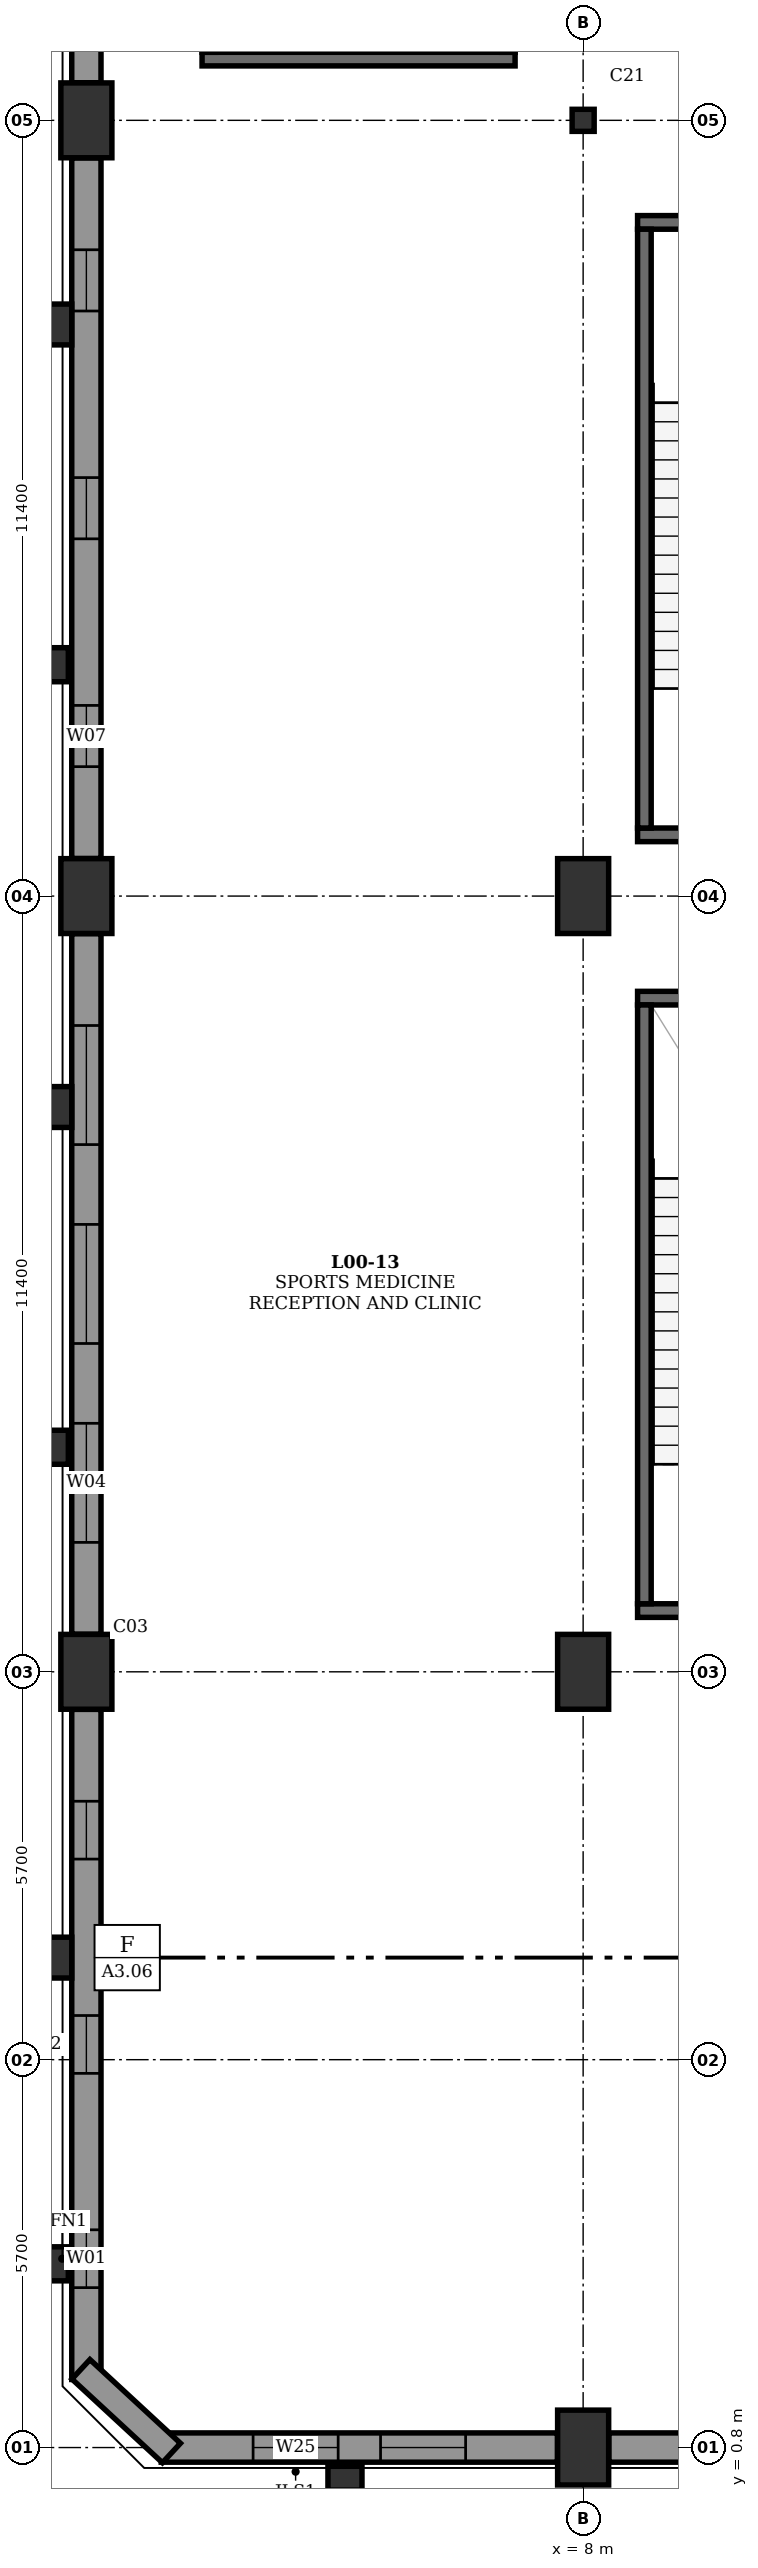
"""IFC4 building model, lengths in metres.
Left out: names, types, materials, properties, quantities, classifications, styles, units other than length and angle.
Written with IfcOpenShell. Run it as: python <this file> out.ifc"""

import sys

from ifc_helpers import new_model, si_unit, direction, frame, frame_2d, origin, origin_2d, place, context, subcontext, project, spatial, rectangle, hollow_circle, extrude, element, fill, save


model = new_model("IFC4")
c1 = context("Model", 3, precision=1e-05, world=origin(), true_north=direction((0.0, 1.0)))
c2 = subcontext(c1, "Body", "Model", "MODEL_VIEW")
j1 = project(units=[si_unit("LENGTHUNIT", "METRE"), si_unit("PLANEANGLEUNIT", "RADIAN")], contexts=[c1])
p1 = place(None, origin())
s1 = spatial("IfcSite", under=j1, at=p1, CompositionType="ELEMENT")
p2 = place(p1, origin())
s2 = spatial("IfcBuilding", under=s1, at=p2, CompositionType="ELEMENT")
p3 = place(p2, origin())
s3 = spatial("IfcBuildingStorey", under=s2, at=p3, CompositionType="ELEMENT", Elevation=0.0)
for number, where, z_axis, x_axis in (
    (1, (0.7, 12.2, 0.0), (0.0, 0.0, 1.0), (1.0, 0.0, 0.0)),
    (2, (0.7, 23.6, 0.0), (0.0, 0.0, 1.0), (1.0, 0.0, 0.0)),
    (3, (0.7, 35.0, 0.0), (0.0, 0.0, 1.0), (1.0, 0.0, 0.0)),
    (4, (8.0, 0.8, 0.0), (0.0, 0.0, 1.0), (1.0, 0.0, 0.0)),
    (5, (8.0, 12.2, 0.0), (0.0, 0.0, 1.0), (1.0, 0.0, 0.0)),
    (6, (8.0, 23.6, 0.0), (0.0, 0.0, 1.0), (1.0, 0.0, 0.0)),
):
    element("IfcColumn", number, at=place(p3, frame(where, z_axis=z_axis, x_axis=x_axis)), inside=s3, PredefinedType="COLUMN", context=c2, shape_type="SweptSolid", body=[
        extrude(rectangle(XDim=0.75, YDim=1.1, at=origin_2d()), origin(), (0.0, 0.0, 1.0), 5.4),
    ])
p4 = place(p3, frame((8.0, 35.0, 0.0), z_axis=(0.0, 0.0, 1.0), x_axis=(1.0, 0.0, 0.0)))
e7 = element("IfcColumn", 7, at=p4, inside=s3, PredefinedType="COLUMN", context=c2, shape_type="SweptSolid", body=[
    extrude(hollow_circle(Radius=0.162, WallThickness=0.013, at=origin_2d()), origin(), (0.0, 0.0, 1.0), 5.4),
])
p5 = place(p3, frame((0.26, 3.5, 0.0), z_axis=(0.0, 0.0, 1.0), x_axis=(1.0, 0.0, 0.0)))
e8 = element("IfcColumn", 8, at=p5, inside=s3, PredefinedType="PILASTER", context=c2, shape_type="SweptSolid", body=[
    extrude(rectangle(XDim=0.35, YDim=0.5, at=origin_2d()), origin(), (0.0, 0.0, 1.0), 5.4),
])
p6 = place(p3, frame((0.26, 8.0, 0.0), z_axis=(0.0, 0.0, 1.0), x_axis=(1.0, 0.0, 0.0)))
e9 = element("IfcColumn", 9, at=p6, inside=s3, PredefinedType="PILASTER", context=c2, shape_type="SweptSolid", body=[
    extrude(rectangle(XDim=0.45, YDim=0.6, at=origin_2d()), origin(), (0.0, 0.0, 1.0), 5.4),
])
p7 = place(p3, frame((0.26, 15.5, 0.0), z_axis=(0.0, 0.0, 1.0), x_axis=(1.0, 0.0, 0.0)))
e10 = element("IfcColumn", 10, at=p7, inside=s3, PredefinedType="PILASTER", context=c2, shape_type="SweptSolid", body=[
    extrude(rectangle(XDim=0.35, YDim=0.5, at=origin_2d()), origin(), (0.0, 0.0, 1.0), 5.4),
])
p8 = place(p3, frame((0.26, 20.5, 0.0), z_axis=(0.0, 0.0, 1.0), x_axis=(1.0, 0.0, 0.0)))
e11 = element("IfcColumn", 11, at=p8, inside=s3, PredefinedType="PILASTER", context=c2, shape_type="SweptSolid", body=[
    extrude(rectangle(XDim=0.45, YDim=0.6, at=origin_2d()), origin(), (0.0, 0.0, 1.0), 5.4),
])
p9 = place(p3, frame((0.26, 27.0, 0.0), z_axis=(0.0, 0.0, 1.0), x_axis=(1.0, 0.0, 0.0)))
e12 = element("IfcColumn", 12, at=p9, inside=s3, PredefinedType="PILASTER", context=c2, shape_type="SweptSolid", body=[
    extrude(rectangle(XDim=0.35, YDim=0.5, at=origin_2d()), origin(), (0.0, 0.0, 1.0), 5.4),
])
p10 = place(p3, frame((0.26, 32.0, 0.0), z_axis=(0.0, 0.0, 1.0), x_axis=(1.0, 0.0, 0.0)))
e13 = element("IfcColumn", 13, at=p10, inside=s3, PredefinedType="PILASTER", context=c2, shape_type="SweptSolid", body=[
    extrude(rectangle(XDim=0.45, YDim=0.6, at=origin_2d()), origin(), (0.0, 0.0, 1.0), 5.4),
])
p11 = place(p3, frame((4.5, 0.35, 0.0), z_axis=(0.0, 0.0, 1.0), x_axis=(0.0, 1.0, 0.0)))
e14 = element("IfcColumn", 14, at=p11, inside=s3, PredefinedType="PILASTER", context=c2, shape_type="SweptSolid", body=[
    extrude(rectangle(XDim=0.35, YDim=0.5, at=origin_2d()), origin(), (0.0, 0.0, 1.0), 5.4),
])
p12 = place(p3, frame((0.7, 1.8, 0.0), z_axis=(0.0, 0.0, 1.0), x_axis=(0.0, 1.0, 0.0)))
e15 = element("IfcWall", 15, at=p12, inside=s3, PredefinedType="STANDARD", context=c2, shape_type="SweptSolid", body=[
    extrude(rectangle(XDim=9.848, YDim=0.43, at=frame_2d((4.924, 0.0))), origin(), (0.0, 0.0, 1.0), 5.1),
])
p13 = place(p12, frame((1.35, 0.0, 0.75)))
e16 = element("IfcOpeningElement", 16, at=p13, cuts=e15, PredefinedType="OPENING", context=c2, shape_type="SweptSolid", body=[
    extrude(rectangle(XDim=0.85, YDim=1.75, at=frame_2d((0.425, 0.875))), frame((0.0, 0.227, 0.0), z_axis=(0.0, -1.0, 0.0), x_axis=(1.0, 0.0, 0.0)), (0.0, 0.0, 1.0), 0.454),
])
p14 = place(p12, frame((4.499, 0.0, 0.75)))
e17 = element("IfcOpeningElement", 17, at=p14, cuts=e15, PredefinedType="OPENING", context=c2, shape_type="SweptSolid", body=[
    extrude(rectangle(XDim=0.85, YDim=1.75, at=frame_2d((0.425, 0.875))), frame((0.0, 0.227, 0.0), z_axis=(0.0, -1.0, 0.0), x_axis=(1.0, 0.0, 0.0)), (0.0, 0.0, 1.0), 0.454),
])
p15 = place(p12, frame((7.648, 0.0, 0.75)))
e18 = element("IfcOpeningElement", 18, at=p15, cuts=e15, PredefinedType="OPENING", context=c2, shape_type="SweptSolid", body=[
    extrude(rectangle(XDim=0.85, YDim=1.75, at=frame_2d((0.425, 0.875))), frame((0.0, 0.227, 0.0), z_axis=(0.0, -1.0, 0.0), x_axis=(1.0, 0.0, 0.0)), (0.0, 0.0, 1.0), 0.454),
])
p16 = place(p3, frame((0.7, 12.752, 0.0), z_axis=(0.0, 0.0, 1.0), x_axis=(0.0, 1.0, 0.0)))
e19 = element("IfcWall", 19, at=p16, inside=s3, PredefinedType="STANDARD", context=c2, shape_type="SweptSolid", body=[
    extrude(rectangle(XDim=10.296, YDim=0.43, at=frame_2d((5.148, 0.0))), origin(), (0.0, 0.0, 1.0), 3.485),
])
p17 = place(p16, frame((1.35, 0.0, 0.75)))
e20 = element("IfcOpeningElement", 20, at=p17, cuts=e19, PredefinedType="OPENING", context=c2, shape_type="SweptSolid", body=[
    extrude(rectangle(XDim=1.75, YDim=1.75, at=frame_2d((0.875, 0.875))), frame((0.0, 0.227, 0.0), z_axis=(0.0, -1.0, 0.0), x_axis=(1.0, 0.0, 0.0)), (0.0, 0.0, 1.0), 0.454),
])
p18 = place(p16, frame((4.273, 0.0, 0.75)))
e21 = element("IfcOpeningElement", 21, at=p18, cuts=e19, PredefinedType="OPENING", context=c2, shape_type="SweptSolid", body=[
    extrude(rectangle(XDim=1.75, YDim=1.75, at=frame_2d((0.875, 0.875))), frame((0.0, 0.227, 0.0), z_axis=(0.0, -1.0, 0.0), x_axis=(1.0, 0.0, 0.0)), (0.0, 0.0, 1.0), 0.454),
])
p19 = place(p16, frame((7.196, 0.0, 0.75)))
e22 = element("IfcOpeningElement", 22, at=p19, cuts=e19, PredefinedType="OPENING", context=c2, shape_type="SweptSolid", body=[
    extrude(rectangle(XDim=1.75, YDim=1.75, at=frame_2d((0.875, 0.875))), frame((0.0, 0.227, 0.0), z_axis=(0.0, -1.0, 0.0), x_axis=(1.0, 0.0, 0.0)), (0.0, 0.0, 1.0), 0.454),
])
p20 = place(p3, frame((0.7, 24.152, 0.0), z_axis=(0.0, 0.0, 1.0), x_axis=(0.0, 1.0, 0.0)))
e23 = element("IfcWall", 23, at=p20, inside=s3, PredefinedType="STANDARD", context=c2, shape_type="SweptSolid", body=[
    extrude(rectangle(XDim=10.296, YDim=0.43, at=frame_2d((5.148, 0.0))), origin(), (0.0, 0.0, 1.0), 3.51),
])
p21 = place(p20, frame((1.35, 0.0, 0.75)))
e24 = element("IfcOpeningElement", 24, at=p21, cuts=e23, PredefinedType="OPENING", context=c2, shape_type="SweptSolid", body=[
    extrude(rectangle(XDim=0.9, YDim=2.05, at=frame_2d((0.45, 1.025))), frame((0.0, 0.227, 0.0), z_axis=(0.0, -1.0, 0.0), x_axis=(1.0, 0.0, 0.0)), (0.0, 0.0, 1.0), 0.454),
])
p22 = place(p20, frame((4.698, 0.0, 0.75)))
e25 = element("IfcOpeningElement", 25, at=p22, cuts=e23, PredefinedType="OPENING", context=c2, shape_type="SweptSolid", body=[
    extrude(rectangle(XDim=0.9, YDim=2.05, at=frame_2d((0.45, 1.025))), frame((0.0, 0.227, 0.0), z_axis=(0.0, -1.0, 0.0), x_axis=(1.0, 0.0, 0.0)), (0.0, 0.0, 1.0), 0.454),
])
p23 = place(p20, frame((8.046, 0.0, 0.75)))
e26 = element("IfcOpeningElement", 26, at=p23, cuts=e23, PredefinedType="OPENING", context=c2, shape_type="SweptSolid", body=[
    extrude(rectangle(XDim=0.9, YDim=2.05, at=frame_2d((0.45, 1.025))), frame((0.0, 0.227, 0.0), z_axis=(0.0, -1.0, 0.0), x_axis=(1.0, 0.0, 0.0)), (0.0, 0.0, 1.0), 0.454),
])
p24 = place(p3, frame((0.7, 35.552, 0.0), z_axis=(0.0, 0.0, 1.0), x_axis=(0.0, 1.0, 0.0)))
e27 = element("IfcWall", 27, at=p24, inside=s3, PredefinedType="STANDARD", context=c2, shape_type="SweptSolid", body=[
    extrude(rectangle(XDim=10.296, YDim=0.43, at=frame_2d((5.148, 0.0))), origin(), (0.0, 0.0, 1.0), 3.485),
])
p25 = place(p24, frame((1.35, 0.0, 0.75)))
e28 = element("IfcOpeningElement", 28, at=p25, cuts=e27, PredefinedType="OPENING", context=c2, shape_type="SweptSolid", body=[
    extrude(rectangle(XDim=1.8, YDim=2.05, at=frame_2d((0.9, 1.025))), frame((0.0, 0.227, 0.0), z_axis=(0.0, -1.0, 0.0), x_axis=(1.0, 0.0, 0.0)), (0.0, 0.0, 1.0), 0.454),
])
p26 = place(p24, frame((4.248, 0.0, 0.75)))
e29 = element("IfcOpeningElement", 29, at=p26, cuts=e27, PredefinedType="OPENING", context=c2, shape_type="SweptSolid", body=[
    extrude(rectangle(XDim=1.8, YDim=2.05, at=frame_2d((0.9, 1.025))), frame((0.0, 0.227, 0.0), z_axis=(0.0, -1.0, 0.0), x_axis=(1.0, 0.0, 0.0)), (0.0, 0.0, 1.0), 0.454),
])
p27 = place(p24, frame((7.146, 0.0, 0.75)))
e30 = element("IfcOpeningElement", 30, at=p27, cuts=e27, PredefinedType="OPENING", context=c2, shape_type="SweptSolid", body=[
    extrude(rectangle(XDim=1.8, YDim=2.05, at=frame_2d((0.9, 1.025))), frame((0.0, 0.227, 0.0), z_axis=(0.0, -1.0, 0.0), x_axis=(1.0, 0.0, 0.0)), (0.0, 0.0, 1.0), 0.454),
])
p28 = place(p3, frame((1.8, 0.8, 0.0), z_axis=(0.0, 0.0, 1.0), x_axis=(1.0, 0.0, 0.0)))
e31 = element("IfcWall", 31, at=p28, inside=s3, PredefinedType="STANDARD", context=c2, shape_type="SweptSolid", body=[
    extrude(rectangle(XDim=5.823, YDim=0.43, at=frame_2d((2.912, 0.0))), origin(), (0.0, 0.0, 1.0), 5.1),
])
p29 = place(p28, frame((1.35, 0.0, 0.75)))
e32 = element("IfcOpeningElement", 32, at=p29, cuts=e31, PredefinedType="OPENING", context=c2, shape_type="SweptSolid", body=[
    extrude(rectangle(XDim=1.25, YDim=2.5, at=frame_2d((0.625, 1.25))), frame((0.0, 0.227, 0.0), z_axis=(0.0, -1.0, 0.0), x_axis=(1.0, 0.0, 0.0)), (0.0, 0.0, 1.0), 0.454),
])
p30 = place(p28, frame((3.223, 0.0, 0.75)))
e33 = element("IfcOpeningElement", 33, at=p30, cuts=e31, PredefinedType="OPENING", context=c2, shape_type="SweptSolid", body=[
    extrude(rectangle(XDim=1.25, YDim=2.5, at=frame_2d((0.625, 1.25))), frame((0.0, 0.227, 0.0), z_axis=(0.0, -1.0, 0.0), x_axis=(1.0, 0.0, 0.0)), (0.0, 0.0, 1.0), 0.454),
])
p31 = place(p3, frame((8.377, 0.8, 0.0), z_axis=(0.0, 0.0, 1.0), x_axis=(1.0, 0.0, 0.0)))
e34 = element("IfcWall", 34, at=p31, inside=s3, PredefinedType="STANDARD", context=c2, shape_type="SweptSolid", body=[
    extrude(rectangle(XDim=7.246, YDim=0.43, at=frame_2d((3.623, 0.0))), origin(), (0.0, 0.0, 1.0), 4.612),
])
p32 = place(p31, frame((2.073, 0.0, 0.75)))
e35 = element("IfcOpeningElement", 35, at=p32, cuts=e34, PredefinedType="OPENING", context=c2, shape_type="SweptSolid", body=[
    extrude(rectangle(XDim=3.1, YDim=2.5, at=frame_2d((1.55, 1.25))), frame((0.0, 0.227, 0.0), z_axis=(0.0, -1.0, 0.0), x_axis=(1.0, 0.0, 0.0)), (0.0, 0.0, 1.0), 0.454),
])
p33 = place(p3, frame((0.62, 1.95, 0.0), z_axis=(0.0, 0.0, 1.0), x_axis=(0.734131351327, -0.679007480812, 0.0)))
e36 = element("IfcWall", 36, at=p33, inside=s3, PredefinedType="STANDARD", context=c2, shape_type="SweptSolid", body=[
    extrude(rectangle(XDim=1.812, YDim=0.39, at=frame_2d((0.906, 0.0))), origin(), (0.0, 0.0, 1.0), 5.1),
])
for number, where, z_axis, x_axis in (
    (37, (8.8, 13.1, 0.0), (0.0, 0.0, 1.0), (1.0, 0.0, 0.0)),
    (38, (8.8, 22.1, 0.0), (0.0, 0.0, 1.0), (1.0, 0.0, 0.0)),
):
    element("IfcWall", number, at=place(p3, frame(where, z_axis=z_axis, x_axis=x_axis)), inside=s3, PredefinedType="SOLIDWALL", context=c2, shape_type="SweptSolid", body=[
        extrude(rectangle(XDim=4.6, YDim=0.2, at=frame_2d((2.3, 0.0))), origin(), (0.0, 0.0, 1.0), 5.16),
    ])
p34 = place(p3, frame((8.9, 13.2, 0.0), z_axis=(0.0, 0.0, 1.0), x_axis=(0.0, 1.0, 0.0)))
e39 = element("IfcWall", 39, at=p34, inside=s3, PredefinedType="SOLIDWALL", context=c2, shape_type="SweptSolid", body=[
    extrude(rectangle(XDim=8.8, YDim=0.2, at=frame_2d((4.4, 0.0))), origin(), (0.0, 0.0, 1.0), 5.16),
])
for number, where, z_axis, x_axis in (
    (40, (8.8, 24.5, 0.0), (0.0, 0.0, 1.0), (1.0, 0.0, 0.0)),
    (41, (8.8, 33.5, 0.0), (0.0, 0.0, 1.0), (1.0, 0.0, 0.0)),
):
    element("IfcWall", number, at=place(p3, frame(where, z_axis=z_axis, x_axis=x_axis)), inside=s3, PredefinedType="SOLIDWALL", context=c2, shape_type="SweptSolid", body=[
        extrude(rectangle(XDim=4.6, YDim=0.2, at=frame_2d((2.3, 0.0))), origin(), (0.0, 0.0, 1.0), 5.16),
    ])
p35 = place(p3, frame((8.9, 24.6, 0.0), z_axis=(0.0, 0.0, 1.0), x_axis=(0.0, 1.0, 0.0)))
e42 = element("IfcWall", 42, at=p35, inside=s3, PredefinedType="SOLIDWALL", context=c2, shape_type="SweptSolid", body=[
    extrude(rectangle(XDim=8.8, YDim=0.2, at=frame_2d((4.4, 0.0))), origin(), (0.0, 0.0, 1.0), 5.16),
])
p36 = place(p3, frame((2.4, 35.9, 0.0), z_axis=(0.0, 0.0, 1.0), x_axis=(1.0, 0.0, 0.0)))
e43 = element("IfcWall", 43, at=p36, inside=s3, PredefinedType="SOLIDWALL", context=c2, shape_type="SweptSolid", body=[
    extrude(rectangle(XDim=4.6, YDim=0.2, at=frame_2d((2.3, 0.0))), origin(), (0.0, 0.0, 1.0), 5.16),
])
p37 = place(p3, frame((2.5, 36.0, 0.0), z_axis=(0.0, 0.0, 1.0), x_axis=(0.0, 1.0, 0.0)))
e44 = element("IfcWall", 44, at=p37, inside=s3, PredefinedType="SOLIDWALL", context=c2, shape_type="SweptSolid", body=[
    extrude(rectangle(XDim=8.8, YDim=0.2, at=frame_2d((4.4, 0.0))), origin(), (0.0, 0.0, 1.0), 5.16),
])
p38 = place(p3, frame((6.9, 36.0, 0.0), z_axis=(0.0, 0.0, 1.0), x_axis=(0.0, 1.0, 0.0)))
e45 = element("IfcWall", 45, at=p38, inside=s3, PredefinedType="SOLIDWALL", context=c2, shape_type="SweptSolid", body=[
    extrude(rectangle(XDim=8.8, YDim=0.2, at=frame_2d((4.4, 0.0))), origin(), (0.0, 0.0, 1.0), 5.16),
])
p39 = place(p38, frame((0.22, 0.0, 0.0)))
e46 = element("IfcOpeningElement", 46, at=p39, cuts=e45, PredefinedType="OPENING", context=c2, shape_type="SweptSolid", body=[
    extrude(rectangle(XDim=1.6, YDim=2.2, at=frame_2d((0.8, 1.1))), frame((0.0, 0.112, 0.0), z_axis=(0.0, -1.0, 0.0), x_axis=(1.0, 0.0, 0.0)), (0.0, 0.0, 1.0), 0.224),
])
p40 = place(p13, origin())
e47 = element("IfcWindow", 47, at=p40, inside=s3, PartitioningType="SINGLE_PANEL", PredefinedType="WINDOW", context=c2, shape_type="SweptSolid", body=[
    extrude(rectangle(XDim=0.85, YDim=1.75, at=frame_2d((0.425, 0.875))), frame((0.0, 0.08, 0.0), z_axis=(0.0, -1.0, 0.0), x_axis=(1.0, 0.0, 0.0)), (0.0, 0.0, 1.0), 0.06),
])
fill(e16, e47)
p41 = place(p14, origin())
e48 = element("IfcWindow", 48, at=p41, inside=s3, PartitioningType="SINGLE_PANEL", PredefinedType="WINDOW", context=c2, shape_type="SweptSolid", body=[
    extrude(rectangle(XDim=0.85, YDim=1.75, at=frame_2d((0.425, 0.875))), frame((0.0, 0.08, 0.0), z_axis=(0.0, -1.0, 0.0), x_axis=(1.0, 0.0, 0.0)), (0.0, 0.0, 1.0), 0.06),
])
fill(e17, e48)
p42 = place(p15, origin())
e49 = element("IfcWindow", 49, at=p42, inside=s3, PartitioningType="SINGLE_PANEL", PredefinedType="WINDOW", context=c2, shape_type="SweptSolid", body=[
    extrude(rectangle(XDim=0.85, YDim=1.75, at=frame_2d((0.425, 0.875))), frame((0.0, 0.08, 0.0), z_axis=(0.0, -1.0, 0.0), x_axis=(1.0, 0.0, 0.0)), (0.0, 0.0, 1.0), 0.06),
])
fill(e18, e49)
p43 = place(p17, origin())
e50 = element("IfcWindow", 50, at=p43, inside=s3, PartitioningType="DOUBLE_PANEL_VERTICAL", PredefinedType="WINDOW", context=c2, shape_type="SweptSolid", body=[
    extrude(rectangle(XDim=1.75, YDim=1.75, at=frame_2d((0.875, 0.875))), frame((0.0, 0.08, 0.0), z_axis=(0.0, -1.0, 0.0), x_axis=(1.0, 0.0, 0.0)), (0.0, 0.0, 1.0), 0.06),
])
fill(e20, e50)
p44 = place(p18, origin())
e51 = element("IfcWindow", 51, at=p44, inside=s3, PartitioningType="DOUBLE_PANEL_VERTICAL", PredefinedType="WINDOW", context=c2, shape_type="SweptSolid", body=[
    extrude(rectangle(XDim=1.75, YDim=1.75, at=frame_2d((0.875, 0.875))), frame((0.0, 0.08, 0.0), z_axis=(0.0, -1.0, 0.0), x_axis=(1.0, 0.0, 0.0)), (0.0, 0.0, 1.0), 0.06),
])
fill(e21, e51)
p45 = place(p19, origin())
e52 = element("IfcWindow", 52, at=p45, inside=s3, PartitioningType="DOUBLE_PANEL_VERTICAL", PredefinedType="WINDOW", context=c2, shape_type="SweptSolid", body=[
    extrude(rectangle(XDim=1.75, YDim=1.75, at=frame_2d((0.875, 0.875))), frame((0.0, 0.08, 0.0), z_axis=(0.0, -1.0, 0.0), x_axis=(1.0, 0.0, 0.0)), (0.0, 0.0, 1.0), 0.06),
])
fill(e22, e52)
p46 = place(p21, origin())
e53 = element("IfcWindow", 53, at=p46, inside=s3, PartitioningType="SINGLE_PANEL", PredefinedType="WINDOW", context=c2, shape_type="SweptSolid", body=[
    extrude(rectangle(XDim=0.9, YDim=2.05, at=frame_2d((0.45, 1.025))), frame((0.0, 0.08, 0.0), z_axis=(0.0, -1.0, 0.0), x_axis=(1.0, 0.0, 0.0)), (0.0, 0.0, 1.0), 0.06),
])
fill(e24, e53)
p47 = place(p22, origin())
e54 = element("IfcWindow", 54, at=p47, inside=s3, PartitioningType="SINGLE_PANEL", PredefinedType="WINDOW", context=c2, shape_type="SweptSolid", body=[
    extrude(rectangle(XDim=0.9, YDim=2.05, at=frame_2d((0.45, 1.025))), frame((0.0, 0.08, 0.0), z_axis=(0.0, -1.0, 0.0), x_axis=(1.0, 0.0, 0.0)), (0.0, 0.0, 1.0), 0.06),
])
fill(e25, e54)
p48 = place(p23, origin())
e55 = element("IfcWindow", 55, at=p48, inside=s3, PartitioningType="SINGLE_PANEL", PredefinedType="WINDOW", context=c2, shape_type="SweptSolid", body=[
    extrude(rectangle(XDim=0.9, YDim=2.05, at=frame_2d((0.45, 1.025))), frame((0.0, 0.08, 0.0), z_axis=(0.0, -1.0, 0.0), x_axis=(1.0, 0.0, 0.0)), (0.0, 0.0, 1.0), 0.06),
])
fill(e26, e55)
p49 = place(p29, origin())
e56 = element("IfcWindow", 56, at=p49, inside=s3, PartitioningType="SINGLE_PANEL", PredefinedType="WINDOW", context=c2, shape_type="SweptSolid", body=[
    extrude(rectangle(XDim=1.25, YDim=2.5, at=frame_2d((0.625, 1.25))), frame((0.0, 0.08, 0.0), z_axis=(0.0, -1.0, 0.0), x_axis=(1.0, 0.0, 0.0)), (0.0, 0.0, 1.0), 0.06),
])
fill(e32, e56)
p50 = place(p30, origin())
e57 = element("IfcWindow", 57, at=p50, inside=s3, PartitioningType="SINGLE_PANEL", PredefinedType="WINDOW", context=c2, shape_type="SweptSolid", body=[
    extrude(rectangle(XDim=1.25, YDim=2.5, at=frame_2d((0.625, 1.25))), frame((0.0, 0.08, 0.0), z_axis=(0.0, -1.0, 0.0), x_axis=(1.0, 0.0, 0.0)), (0.0, 0.0, 1.0), 0.06),
])
fill(e33, e57)
save(model, sys.argv[1])
